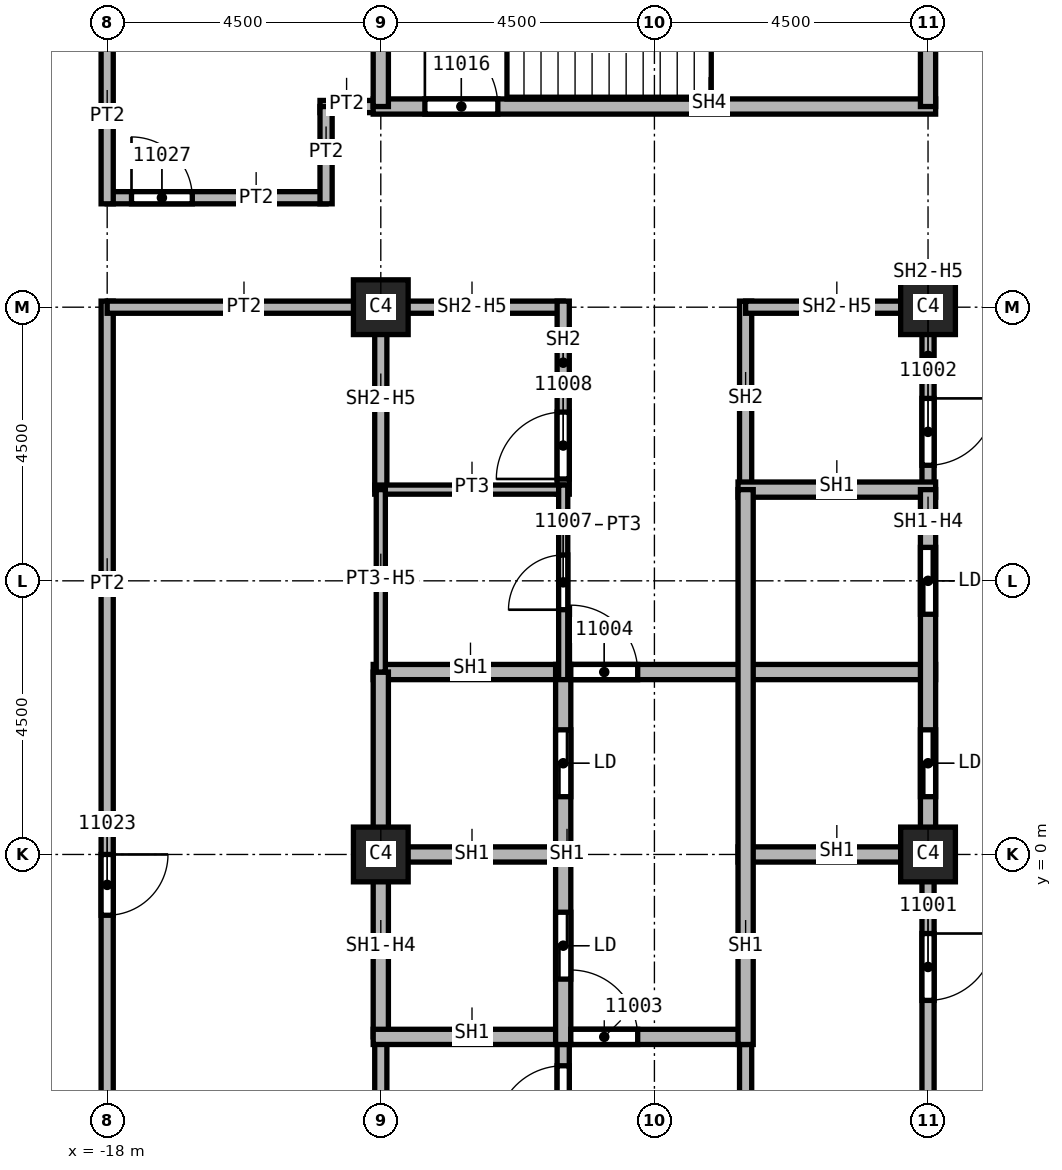
"""IFC4 building model, lengths in metres.
Left out: names, types, materials, properties, quantities, classifications, styles, units other than length and angle.
Written with IfcOpenShell. Run it as: python <this file> out.ifc"""

import sys

from ifc_helpers import new_model, si_unit, direction, frame, frame_2d, origin, origin_2d, place, context, subcontext, project, spatial, rectangle, extrude, element, fill, save


model = new_model("IFC4")
c1 = context("Model", 3, precision=1e-05, world=origin(), true_north=direction((0.0, 1.0)))
c2 = subcontext(c1, "Body", "Model", "MODEL_VIEW")
j1 = project(units=[si_unit("LENGTHUNIT", "METRE"), si_unit("PLANEANGLEUNIT", "RADIAN")], contexts=[c1])
p1 = place(None, origin())
s1 = spatial("IfcSite", under=j1, at=p1, CompositionType="ELEMENT")
p2 = place(p1, origin())
s2 = spatial("IfcBuilding", under=s1, at=p2, CompositionType="ELEMENT")
p3 = place(p2, frame((0.0, 0.0, 184.0)))
s3 = spatial("IfcBuildingStorey", under=s2, at=p3, CompositionType="ELEMENT", Elevation=184.0)
for number, where, z_axis, x_axis in (
    (1, (-4.5, 0.0, 0.0), (0.0, 0.0, 1.0), (1.0, 0.0, 0.0)),
    (2, (-4.5, 9.0, 0.0), (0.0, 0.0, 1.0), (1.0, 0.0, 0.0)),
    (3, (-13.5, 0.0, 0.0), (0.0, 0.0, 1.0), (1.0, 0.0, 0.0)),
    (4, (-13.5, 9.0, 0.0), (0.0, 0.0, 1.0), (1.0, 0.0, 0.0)),
):
    element("IfcColumn", number, at=place(p3, frame(where, z_axis=z_axis, x_axis=x_axis)), inside=s3, PredefinedType="COLUMN", context=c2, shape_type="SweptSolid", body=[
        extrude(rectangle(XDim=0.9, YDim=0.9, at=origin_2d()), origin(), (0.0, 0.0, 1.0), 3.72),
    ])
p4 = place(p3, frame((-18.0, 9.1, 0.0), z_axis=(0.0, 0.0, 1.0), x_axis=(0.0, -1.0, 0.0)))
e5 = element("IfcWall", 5, at=p4, inside=s3, PredefinedType="PARTITIONING", context=c2, shape_type="SweptSolid", body=[
    extrude(rectangle(XDim=18.2, YDim=0.2, at=frame_2d((9.1, 0.0))), origin(), (0.0, 0.0, 1.0), 3.72),
])
p5 = place(p4, frame((13.75, 0.0, 0.0)))
e6 = element("IfcOpeningElement", 6, at=p5, cuts=e5, PredefinedType="OPENING", context=c2, shape_type="SweptSolid", body=[
    extrude(rectangle(XDim=1.0, YDim=2.1, at=frame_2d((0.5, 1.05))), frame((0.0, 0.1, 0.0), z_axis=(0.0, -1.0, 0.0), x_axis=(1.0, 0.0, 0.0)), (0.0, 0.0, 1.0), 0.2),
])
p6 = place(p4, frame((9.1, 0.0, 0.0)))
e7 = element("IfcOpeningElement", 7, at=p6, cuts=e5, PredefinedType="OPENING", context=c2, shape_type="SweptSolid", body=[
    extrude(rectangle(XDim=1.0, YDim=2.1, at=frame_2d((0.5, 1.05))), frame((0.0, 0.1, 0.0), z_axis=(0.0, -1.0, 0.0), x_axis=(1.0, 0.0, 0.0)), (0.0, 0.0, 1.0), 0.2),
])
p7 = place(p3, frame((-18.0, 10.8, 0.0), z_axis=(0.0, 0.0, 1.0), x_axis=(1.0, 0.0, 0.0)))
e8 = element("IfcWall", 8, at=p7, inside=s3, PredefinedType="PARTITIONING", context=c2, shape_type="SweptSolid", body=[
    extrude(rectangle(XDim=3.6, YDim=0.2, at=frame_2d((1.8, 0.0))), origin(), (0.0, 0.0, 1.0), 3.72),
])
p8 = place(p7, frame((0.4, 0.0, 0.0)))
e9 = element("IfcOpeningElement", 9, at=p8, cuts=e8, PredefinedType="OPENING", context=c2, shape_type="SweptSolid", body=[
    extrude(rectangle(XDim=1.0, YDim=2.1, at=frame_2d((0.5, 1.05))), frame((0.0, 0.1, 0.0), z_axis=(0.0, -1.0, 0.0), x_axis=(1.0, 0.0, 0.0)), (0.0, 0.0, 1.0), 0.2),
])
p9 = place(p3, frame((-18.0, 13.6, 0.0), z_axis=(0.0, 0.0, 1.0), x_axis=(0.0, -1.0, 0.0)))
e10 = element("IfcWall", 10, at=p9, inside=s3, PredefinedType="PARTITIONING", context=c2, shape_type="SweptSolid", body=[
    extrude(rectangle(XDim=2.9, YDim=0.2, at=frame_2d((1.45, 0.0))), origin(), (0.0, 0.0, 1.0), 3.72),
])
p10 = place(p3, frame((-14.5, 12.3, 0.0), z_axis=(0.0, 0.0, 1.0), x_axis=(1.0, 0.0, 0.0)))
e11 = element("IfcWall", 11, at=p10, inside=s3, PredefinedType="PARTITIONING", context=c2, shape_type="SweptSolid", body=[
    extrude(rectangle(XDim=1.125, YDim=0.2, at=frame_2d((0.562, 0.0))), origin(), (0.0, 0.0, 1.0), 3.72),
])
p11 = place(p3, frame((-13.5, 9.0, 0.0), z_axis=(0.0, 0.0, 1.0), x_axis=(-1.0, 0.0, 0.0)))
e12 = element("IfcWall", 12, at=p11, inside=s3, PredefinedType="PARTITIONING", context=c2, shape_type="SweptSolid", body=[
    extrude(rectangle(XDim=4.5, YDim=0.2, at=frame_2d((2.25, 0.0))), origin(), (0.0, 0.0, 1.0), 3.72),
])
p12 = place(p3, frame((-14.4, 10.7, 0.0), z_axis=(0.0, 0.0, 1.0), x_axis=(0.0, 1.0, 0.0)))
e13 = element("IfcWall", 13, at=p12, inside=s3, PredefinedType="PARTITIONING", context=c2, shape_type="SweptSolid", body=[
    extrude(rectangle(XDim=1.6, YDim=0.2, at=frame_2d((0.8, 0.0))), origin(), (0.0, 0.0, 1.0), 3.72),
])
p13 = place(p3, frame((-13.6, 9.0, 0.0), z_axis=(0.0, 0.0, 1.0), x_axis=(1.0, 0.0, 0.0)))
e14 = element("IfcWall", 14, at=p13, inside=s3, PredefinedType="SOLIDWALL", context=c2, shape_type="SweptSolid", body=[
    extrude(rectangle(XDim=3.1, YDim=0.2, at=frame_2d((1.55, 0.0))), origin(), (0.0, 0.0, 1.0), 2.958),
])
p14 = place(p3, frame((-13.5, -7.0, 0.0), z_axis=(0.0, 0.0, 1.0), x_axis=(0.0, 1.0, 0.0)))
e15 = element("IfcWall", 15, at=p14, inside=s3, PredefinedType="SOLIDWALL", context=c2, shape_type="SweptSolid", body=[
    extrude(rectangle(XDim=4.0, YDim=0.2, at=frame_2d((2.0, 0.0))), origin(), (0.0, 0.0, 1.0), 2.958),
])
p15 = place(p3, frame((-13.5, 6.0, 0.0), z_axis=(0.0, 0.0, 1.0), x_axis=(0.0, 1.0, 0.0)))
e16 = element("IfcWall", 16, at=p15, inside=s3, PredefinedType="SOLIDWALL", context=c2, shape_type="SweptSolid", body=[
    extrude(rectangle(XDim=3.1, YDim=0.2, at=frame_2d((1.55, 0.0))), origin(), (0.0, 0.0, 1.0), 2.958),
])
p16 = place(p3, frame((-10.5, -7.075, 0.0), z_axis=(0.0, 0.0, 1.0), x_axis=(0.0, 1.0, 0.0)))
e17 = element("IfcWall", 17, at=p16, inside=s3, PredefinedType="SOLIDWALL", context=c2, shape_type="SweptSolid", body=[
    extrude(rectangle(XDim=4.2, YDim=0.2, at=frame_2d((2.1, 0.0))), origin(), (0.0, 0.0, 1.0), 3.72),
])
p17 = place(p16, frame((2.5, 0.0, 0.0)))
e18 = element("IfcOpeningElement", 18, at=p17, cuts=e17, PredefinedType="OPENING", context=c2, shape_type="SweptSolid", body=[
    extrude(rectangle(XDim=1.1, YDim=2.1, at=frame_2d((0.55, 1.05))), frame((0.0, 0.1, 0.0), z_axis=(0.0, -1.0, 0.0), x_axis=(1.0, 0.0, 0.0)), (0.0, 0.0, 1.0), 0.2),
])
p18 = place(p3, frame((-10.5, 5.925, 0.0), z_axis=(0.0, 0.0, 1.0), x_axis=(0.0, 1.0, 0.0)))
e19 = element("IfcWall", 19, at=p18, inside=s3, PredefinedType="SOLIDWALL", context=c2, shape_type="SweptSolid", body=[
    extrude(rectangle(XDim=3.175, YDim=0.2, at=frame_2d((1.587, 0.0))), origin(), (0.0, 0.0, 1.0), 3.72),
])
p19 = place(p18, frame((0.25, 0.0, 0.0)))
e20 = element("IfcOpeningElement", 20, at=p19, cuts=e19, PredefinedType="OPENING", context=c2, shape_type="SweptSolid", body=[
    extrude(rectangle(XDim=1.1, YDim=2.1, at=frame_2d((0.55, 1.05))), frame((0.0, 0.1, 0.0), z_axis=(0.0, -1.0, 0.0), x_axis=(1.0, 0.0, 0.0)), (0.0, 0.0, 1.0), 0.2),
])
p20 = place(p3, frame((-7.5, -9.1, 0.0), z_axis=(0.0, 0.0, 1.0), x_axis=(0.0, 1.0, 0.0)))
e21 = element("IfcWall", 21, at=p20, inside=s3, PredefinedType="SOLIDWALL", context=c2, shape_type="SweptSolid", body=[
    extrude(rectangle(XDim=6.225, YDim=0.2, at=frame_2d((3.113, 0.0))), origin(), (0.0, 0.0, 1.0), 3.72),
])
p21 = place(p3, frame((-7.5, 6.0, 0.0), z_axis=(0.0, 0.0, 1.0), x_axis=(0.0, 1.0, 0.0)))
e22 = element("IfcWall", 22, at=p21, inside=s3, PredefinedType="SOLIDWALL", context=c2, shape_type="SweptSolid", body=[
    extrude(rectangle(XDim=3.1, YDim=0.2, at=frame_2d((1.55, 0.0))), origin(), (0.0, 0.0, 1.0), 3.72),
])
p22 = place(p3, frame((-7.5, 9.0, 0.0), z_axis=(0.0, 0.0, 1.0), x_axis=(1.0, 0.0, 0.0)))
e23 = element("IfcWall", 23, at=p22, inside=s3, PredefinedType="SOLIDWALL", context=c2, shape_type="SweptSolid", body=[
    extrude(rectangle(XDim=3.0, YDim=0.2, at=frame_2d((1.5, 0.0))), origin(), (0.0, 0.0, 1.0), 2.958),
])
p23 = place(p3, frame((-4.5, 0.0, 0.0), z_axis=(0.0, 0.0, 1.0), x_axis=(0.0, -1.0, 0.0)))
e24 = element("IfcWall", 24, at=p23, inside=s3, PredefinedType="SOLIDWALL", context=c2, shape_type="SweptSolid", body=[
    extrude(rectangle(XDim=9.1, YDim=0.2, at=frame_2d((4.55, 0.0))), origin(), (0.0, 0.0, 1.0), 2.958),
])
p24 = place(p23, frame((1.3, 0.0, 0.0)))
e25 = element("IfcOpeningElement", 25, at=p24, cuts=e24, PredefinedType="OPENING", context=c2, shape_type="SweptSolid", body=[
    extrude(rectangle(XDim=1.1, YDim=2.1, at=frame_2d((0.55, 1.05))), frame((0.0, 0.1, 0.0), z_axis=(0.0, -1.0, 0.0), x_axis=(1.0, 0.0, 0.0)), (0.0, 0.0, 1.0), 0.2),
])
p25 = place(p3, frame((-4.5, 9.1, 0.0), z_axis=(0.0, 0.0, 1.0), x_axis=(0.0, -1.0, 0.0)))
e26 = element("IfcWall", 26, at=p25, inside=s3, PredefinedType="SOLIDWALL", context=c2, shape_type="SweptSolid", body=[
    extrude(rectangle(XDim=3.1, YDim=0.2, at=frame_2d((1.55, 0.0))), origin(), (0.0, 0.0, 1.0), 2.958),
])
p26 = place(p25, frame((1.6, 0.0, 0.0)))
e27 = element("IfcOpeningElement", 27, at=p26, cuts=e26, PredefinedType="OPENING", context=c2, shape_type="SweptSolid", body=[
    extrude(rectangle(XDim=1.1, YDim=2.1, at=frame_2d((0.55, 1.05))), frame((0.0, 0.1, 0.0), z_axis=(0.0, -1.0, 0.0), x_axis=(1.0, 0.0, 0.0)), (0.0, 0.0, 1.0), 0.2),
])
p27 = place(p3, frame((-13.625, 0.0, 0.0), z_axis=(0.0, 0.0, 1.0), x_axis=(1.0, 0.0, 0.0)))
e28 = element("IfcWall", 28, at=p27, inside=s3, PredefinedType="SOLIDWALL", context=c2, shape_type="SweptSolid", body=[
    extrude(rectangle(XDim=3.125, YDim=0.25, at=frame_2d((1.562, 0.0))), origin(), (0.0, 0.0, 1.0), 3.72),
])
p28 = place(p3, frame((-13.625, 3.0, 0.0), z_axis=(0.0, 0.0, 1.0), x_axis=(1.0, 0.0, 0.0)))
e29 = element("IfcWall", 29, at=p28, inside=s3, PredefinedType="SOLIDWALL", context=c2, shape_type="SweptSolid", body=[
    extrude(rectangle(XDim=9.25, YDim=0.25, at=frame_2d((4.625, 0.0))), origin(), (0.0, 0.0, 1.0), 3.72),
])
p29 = place(p28, frame((3.25, 0.0, 0.0)))
e30 = element("IfcOpeningElement", 30, at=p29, cuts=e29, PredefinedType="OPENING", context=c2, shape_type="SweptSolid", body=[
    extrude(rectangle(XDim=1.1, YDim=2.1, at=frame_2d((0.55, 1.05))), frame((0.0, 0.125, 0.0), z_axis=(0.0, -1.0, 0.0), x_axis=(1.0, 0.0, 0.0)), (0.0, 0.0, 1.0), 0.25),
])
p30 = place(p3, frame((-13.5, -3.0, 0.0), z_axis=(0.0, 0.0, 1.0), x_axis=(0.0, 1.0, 0.0)))
e31 = element("IfcWall", 31, at=p30, inside=s3, PredefinedType="SOLIDWALL", context=c2, shape_type="SweptSolid", body=[
    extrude(rectangle(XDim=6.0, YDim=0.25, at=frame_2d((3.0, 0.0))), origin(), (0.0, 0.0, 1.0), 2.958),
])
p31 = place(p3, frame((-13.625, -3.0, 0.0), z_axis=(0.0, 0.0, 1.0), x_axis=(1.0, 0.0, 0.0)))
e32 = element("IfcWall", 32, at=p31, inside=s3, PredefinedType="SOLIDWALL", context=c2, shape_type="SweptSolid", body=[
    extrude(rectangle(XDim=6.125, YDim=0.25, at=frame_2d((3.062, 0.0))), origin(), (0.0, 0.0, 1.0), 3.72),
])
p32 = place(p31, frame((3.25, 0.0, 0.0)))
e33 = element("IfcOpeningElement", 33, at=p32, cuts=e32, PredefinedType="OPENING", context=c2, shape_type="SweptSolid", body=[
    extrude(rectangle(XDim=1.1, YDim=2.1, at=frame_2d((0.55, 1.05))), frame((0.0, 0.125, 0.0), z_axis=(0.0, -1.0, 0.0), x_axis=(1.0, 0.0, 0.0)), (0.0, 0.0, 1.0), 0.25),
])
p33 = place(p3, frame((-10.5, -3.125, 0.0), z_axis=(0.0, 0.0, 1.0), x_axis=(0.0, 1.0, 0.0)))
e34 = element("IfcWall", 34, at=p33, inside=s3, PredefinedType="SOLIDWALL", context=c2, shape_type="SweptSolid", body=[
    extrude(rectangle(XDim=6.25, YDim=0.25, at=frame_2d((3.125, 0.0))), origin(), (0.0, 0.0, 1.0), 3.72),
])
p34 = place(p33, frame((1.075, 0.0, 0.0)))
e35 = element("IfcOpeningElement", 35, at=p34, cuts=e34, PredefinedType="OPENING", context=c2, shape_type="SweptSolid", body=[
    extrude(rectangle(XDim=1.1, YDim=2.1, at=frame_2d((0.55, 1.05))), frame((0.0, 0.125, 0.0), z_axis=(0.0, -1.0, 0.0), x_axis=(1.0, 0.0, 0.0)), (0.0, 0.0, 1.0), 0.25),
])
p35 = place(p33, frame((4.075, 0.0, 0.0)))
e36 = element("IfcOpeningElement", 36, at=p35, cuts=e34, PredefinedType="OPENING", context=c2, shape_type="SweptSolid", body=[
    extrude(rectangle(XDim=1.1, YDim=2.1, at=frame_2d((0.55, 1.05))), frame((0.0, 0.125, 0.0), z_axis=(0.0, -1.0, 0.0), x_axis=(1.0, 0.0, 0.0)), (0.0, 0.0, 1.0), 0.25),
])
for number, where, z_axis, x_axis in (
    (37, (-7.625, 0.0, 0.0), (0.0, 0.0, 1.0), (1.0, 0.0, 0.0)),
    (38, (-7.625, 6.0, 0.0), (0.0, 0.0, 1.0), (1.0, 0.0, 0.0)),
):
    element("IfcWall", number, at=place(p3, frame(where, z_axis=z_axis, x_axis=x_axis)), inside=s3, PredefinedType="SOLIDWALL", context=c2, shape_type="SweptSolid", body=[
        extrude(rectangle(XDim=3.25, YDim=0.25, at=frame_2d((1.625, 0.0))), origin(), (0.0, 0.0, 1.0), 3.72),
    ])
p36 = place(p3, frame((-7.5, -3.125, 0.0), z_axis=(0.0, 0.0, 1.0), x_axis=(0.0, 1.0, 0.0)))
e39 = element("IfcWall", 39, at=p36, inside=s3, PredefinedType="SOLIDWALL", context=c2, shape_type="SweptSolid", body=[
    extrude(rectangle(XDim=9.125, YDim=0.25, at=frame_2d((4.562, 0.0))), origin(), (0.0, 0.0, 1.0), 3.72),
])
p37 = place(p3, frame((-4.5, 6.0, 0.0), z_axis=(0.0, 0.0, 1.0), x_axis=(0.0, -1.0, 0.0)))
e40 = element("IfcWall", 40, at=p37, inside=s3, PredefinedType="SOLIDWALL", context=c2, shape_type="SweptSolid", body=[
    extrude(rectangle(XDim=6.0, YDim=0.25, at=frame_2d((3.0, 0.0))), origin(), (0.0, 0.0, 1.0), 2.958),
])
p38 = place(p37, frame((3.95, 0.0, 0.0)))
e41 = element("IfcOpeningElement", 41, at=p38, cuts=e40, PredefinedType="OPENING", context=c2, shape_type="SweptSolid", body=[
    extrude(rectangle(XDim=1.1, YDim=2.1, at=frame_2d((0.55, 1.05))), frame((0.0, 0.125, 0.0), z_axis=(0.0, -1.0, 0.0), x_axis=(1.0, 0.0, 0.0)), (0.0, 0.0, 1.0), 0.25),
])
p39 = place(p37, frame((0.95, 0.0, 0.0)))
e42 = element("IfcOpeningElement", 42, at=p39, cuts=e40, PredefinedType="OPENING", context=c2, shape_type="SweptSolid", body=[
    extrude(rectangle(XDim=1.1, YDim=2.1, at=frame_2d((0.55, 1.05))), frame((0.0, 0.125, 0.0), z_axis=(0.0, -1.0, 0.0), x_axis=(1.0, 0.0, 0.0)), (0.0, 0.0, 1.0), 0.25),
])
p40 = place(p3, frame((-13.625, 12.3, 0.0), z_axis=(0.0, 0.0, 1.0), x_axis=(1.0, 0.0, 0.0)))
e43 = element("IfcWall", 43, at=p40, inside=s3, PredefinedType="SOLIDWALL", context=c2, shape_type="SweptSolid", body=[
    extrude(rectangle(XDim=9.25, YDim=0.25, at=frame_2d((4.625, 0.0))), origin(), (0.0, 0.0, 1.0), 3.72),
])
p41 = place(p40, frame((0.85, 0.0, 0.0)))
e44 = element("IfcOpeningElement", 44, at=p41, cuts=e43, PredefinedType="OPENING", context=c2, shape_type="SweptSolid", body=[
    extrude(rectangle(XDim=1.2, YDim=2.1, at=frame_2d((0.6, 1.05))), frame((0.0, 0.125, 0.0), z_axis=(0.0, -1.0, 0.0), x_axis=(1.0, 0.0, 0.0)), (0.0, 0.0, 1.0), 0.25),
])
for number, where, z_axis, x_axis in (
    (45, (-13.5, 12.3, 0.0), (0.0, 0.0, 1.0), (0.0, 1.0, 0.0)),
    (46, (-4.5, 16.8, 0.0), (0.0, 0.0, 1.0), (0.0, -1.0, 0.0)),
):
    element("IfcWall", number, at=place(p3, frame(where, z_axis=z_axis, x_axis=x_axis)), inside=s3, PredefinedType="SOLIDWALL", context=c2, shape_type="SweptSolid", body=[
        extrude(rectangle(XDim=4.5, YDim=0.25, at=frame_2d((2.25, 0.0))), origin(), (0.0, 0.0, 1.0), 3.72),
    ])
p42 = place(p3, frame((-13.6, 6.0, 0.0), z_axis=(0.0, 0.0, 1.0), x_axis=(1.0, 0.0, 0.0)))
e47 = element("IfcWall", 47, at=p42, inside=s3, PredefinedType="PARTITIONING", context=c2, shape_type="SweptSolid", body=[
    extrude(rectangle(XDim=3.1, YDim=0.15, at=frame_2d((1.55, 0.0))), origin(), (0.0, 0.0, 1.0), 3.72),
])
p43 = place(p3, frame((-13.5, 3.0, 0.0), z_axis=(0.0, 0.0, 1.0), x_axis=(0.0, 1.0, 0.0)))
e48 = element("IfcWall", 48, at=p43, inside=s3, PredefinedType="PARTITIONING", context=c2, shape_type="SweptSolid", body=[
    extrude(rectangle(XDim=3.0, YDim=0.15, at=frame_2d((1.5, 0.0))), origin(), (0.0, 0.0, 1.0), 2.958),
])
p44 = place(p3, frame((-10.5, 2.875, 0.0), z_axis=(0.0, 0.0, 1.0), x_axis=(0.0, 1.0, 0.0)))
e49 = element("IfcWall", 49, at=p44, inside=s3, PredefinedType="PARTITIONING", context=c2, shape_type="SweptSolid", body=[
    extrude(rectangle(XDim=3.2, YDim=0.15, at=frame_2d((1.6, 0.0))), origin(), (0.0, 0.0, 1.0), 3.72),
])
p45 = place(p44, frame((1.15, 0.0, 0.0)))
e50 = element("IfcOpeningElement", 50, at=p45, cuts=e49, PredefinedType="OPENING", context=c2, shape_type="SweptSolid", body=[
    extrude(rectangle(XDim=0.9, YDim=2.1, at=frame_2d((0.45, 1.05))), frame((0.0, 0.075, 0.0), z_axis=(0.0, -1.0, 0.0), x_axis=(1.0, 0.0, 0.0)), (0.0, 0.0, 1.0), 0.15),
])
p46 = place(p24, origin())
e51 = element("IfcDoor", 51, at=p46, inside=s3, OperationType="SINGLE_SWING_RIGHT", PredefinedType="DOOR", context=c2, shape_type="SweptSolid", body=[
    extrude(rectangle(XDim=1.1, YDim=2.1, at=frame_2d((0.55, 1.05))), frame((0.0, 0.025, 0.0), z_axis=(0.0, -1.0, 0.0), x_axis=(1.0, 0.0, 0.0)), (0.0, 0.0, 1.0), 0.05),
])
fill(e25, e51)
p47 = place(p26, origin())
e52 = element("IfcDoor", 52, at=p47, inside=s3, OperationType="SINGLE_SWING_LEFT", PredefinedType="DOOR", context=c2, shape_type="SweptSolid", body=[
    extrude(rectangle(XDim=1.1, YDim=2.1, at=frame_2d((0.55, 1.05))), frame((0.0, 0.025, 0.0), z_axis=(0.0, -1.0, 0.0), x_axis=(1.0, 0.0, 0.0)), (0.0, 0.0, 1.0), 0.05),
])
fill(e27, e52)
p48 = place(p32, origin())
e53 = element("IfcDoor", 53, at=p48, inside=s3, OperationType="SINGLE_SWING_RIGHT", PredefinedType="DOOR", context=c2, shape_type="SweptSolid", body=[
    extrude(rectangle(XDim=1.1, YDim=2.1, at=frame_2d((0.55, 1.05))), frame((0.0, 0.025, 0.0), z_axis=(0.0, -1.0, 0.0), x_axis=(1.0, 0.0, 0.0)), (0.0, 0.0, 1.0), 0.05),
])
fill(e33, e53)
p49 = place(p29, origin())
e54 = element("IfcDoor", 54, at=p49, inside=s3, OperationType="SINGLE_SWING_LEFT", PredefinedType="DOOR", context=c2, shape_type="SweptSolid", body=[
    extrude(rectangle(XDim=1.1, YDim=2.1, at=frame_2d((0.55, 1.05))), frame((0.0, 0.025, 0.0), z_axis=(0.0, -1.0, 0.0), x_axis=(1.0, 0.0, 0.0)), (0.0, 0.0, 1.0), 0.05),
])
fill(e30, e54)
p50 = place(p17, origin())
e55 = element("IfcDoor", 55, at=p50, inside=s3, OperationType="SINGLE_SWING_LEFT", PredefinedType="DOOR", context=c2, shape_type="SweptSolid", body=[
    extrude(rectangle(XDim=1.1, YDim=2.1, at=frame_2d((0.55, 1.05))), frame((0.0, 0.025, 0.0), z_axis=(0.0, -1.0, 0.0), x_axis=(1.0, 0.0, 0.0)), (0.0, 0.0, 1.0), 0.05),
])
fill(e18, e55)
p51 = place(p45, origin())
e56 = element("IfcDoor", 56, at=p51, inside=s3, OperationType="SINGLE_SWING_RIGHT", PredefinedType="DOOR", context=c2, shape_type="SweptSolid", body=[
    extrude(rectangle(XDim=0.9, YDim=2.1, at=frame_2d((0.45, 1.05))), frame((0.0, 0.025, 0.0), z_axis=(0.0, -1.0, 0.0), x_axis=(1.0, 0.0, 0.0)), (0.0, 0.0, 1.0), 0.05),
])
fill(e50, e56)
p52 = place(p19, origin())
e57 = element("IfcDoor", 57, at=p52, inside=s3, OperationType="SINGLE_SWING_LEFT", PredefinedType="DOOR", context=c2, shape_type="SweptSolid", body=[
    extrude(rectangle(XDim=1.1, YDim=2.1, at=frame_2d((0.55, 1.05))), frame((0.0, 0.025, 0.0), z_axis=(0.0, -1.0, 0.0), x_axis=(1.0, 0.0, 0.0)), (0.0, 0.0, 1.0), 0.05),
])
fill(e20, e57)
p53 = place(p41, origin())
e58 = element("IfcDoor", 58, at=p53, inside=s3, OperationType="SINGLE_SWING_LEFT", PredefinedType="DOOR", context=c2, shape_type="SweptSolid", body=[
    extrude(rectangle(XDim=1.2, YDim=2.1, at=frame_2d((0.6, 1.05))), frame((0.0, 0.025, 0.0), z_axis=(0.0, -1.0, 0.0), x_axis=(1.0, 0.0, 0.0)), (0.0, 0.0, 1.0), 0.05),
])
fill(e44, e58)
p54 = place(p6, origin())
e59 = element("IfcDoor", 59, at=p54, inside=s3, OperationType="SINGLE_SWING_RIGHT", PredefinedType="DOOR", context=c2, shape_type="SweptSolid", body=[
    extrude(rectangle(XDim=1.0, YDim=2.1, at=frame_2d((0.5, 1.05))), frame((0.0, 0.025, 0.0), z_axis=(0.0, -1.0, 0.0), x_axis=(1.0, 0.0, 0.0)), (0.0, 0.0, 1.0), 0.05),
])
fill(e7, e59)
p55 = place(p8, origin())
e60 = element("IfcDoor", 60, at=p55, inside=s3, OperationType="SINGLE_SWING_RIGHT", PredefinedType="DOOR", context=c2, shape_type="SweptSolid", body=[
    extrude(rectangle(XDim=1.0, YDim=2.1, at=frame_2d((0.5, 1.05))), frame((0.0, 0.025, 0.0), z_axis=(0.0, -1.0, 0.0), x_axis=(1.0, 0.0, 0.0)), (0.0, 0.0, 1.0), 0.05),
])
fill(e9, e60)
p56 = place(p38, origin())
e61 = element("IfcDoor", 61, at=p56, inside=s3, OperationType="SLIDING_TO_LEFT", PredefinedType="DOOR", context=c2, shape_type="SweptSolid", body=[
    extrude(rectangle(XDim=1.1, YDim=2.1, at=frame_2d((0.55, 1.05))), frame((0.0, 0.025, 0.0), z_axis=(0.0, -1.0, 0.0), x_axis=(1.0, 0.0, 0.0)), (0.0, 0.0, 1.0), 0.05),
])
fill(e41, e61)
p57 = place(p39, origin())
e62 = element("IfcDoor", 62, at=p57, inside=s3, OperationType="SLIDING_TO_LEFT", PredefinedType="DOOR", context=c2, shape_type="SweptSolid", body=[
    extrude(rectangle(XDim=1.1, YDim=2.1, at=frame_2d((0.55, 1.05))), frame((0.0, 0.025, 0.0), z_axis=(0.0, -1.0, 0.0), x_axis=(1.0, 0.0, 0.0)), (0.0, 0.0, 1.0), 0.05),
])
fill(e42, e62)
p58 = place(p34, origin())
e63 = element("IfcDoor", 63, at=p58, inside=s3, OperationType="SLIDING_TO_LEFT", PredefinedType="DOOR", context=c2, shape_type="SweptSolid", body=[
    extrude(rectangle(XDim=1.1, YDim=2.1, at=frame_2d((0.55, 1.05))), frame((0.0, 0.025, 0.0), z_axis=(0.0, -1.0, 0.0), x_axis=(1.0, 0.0, 0.0)), (0.0, 0.0, 1.0), 0.05),
])
fill(e35, e63)
p59 = place(p35, origin())
e64 = element("IfcDoor", 64, at=p59, inside=s3, OperationType="SLIDING_TO_LEFT", PredefinedType="DOOR", context=c2, shape_type="SweptSolid", body=[
    extrude(rectangle(XDim=1.1, YDim=2.1, at=frame_2d((0.55, 1.05))), frame((0.0, 0.025, 0.0), z_axis=(0.0, -1.0, 0.0), x_axis=(1.0, 0.0, 0.0)), (0.0, 0.0, 1.0), 0.05),
])
fill(e36, e64)
save(model, sys.argv[1])
